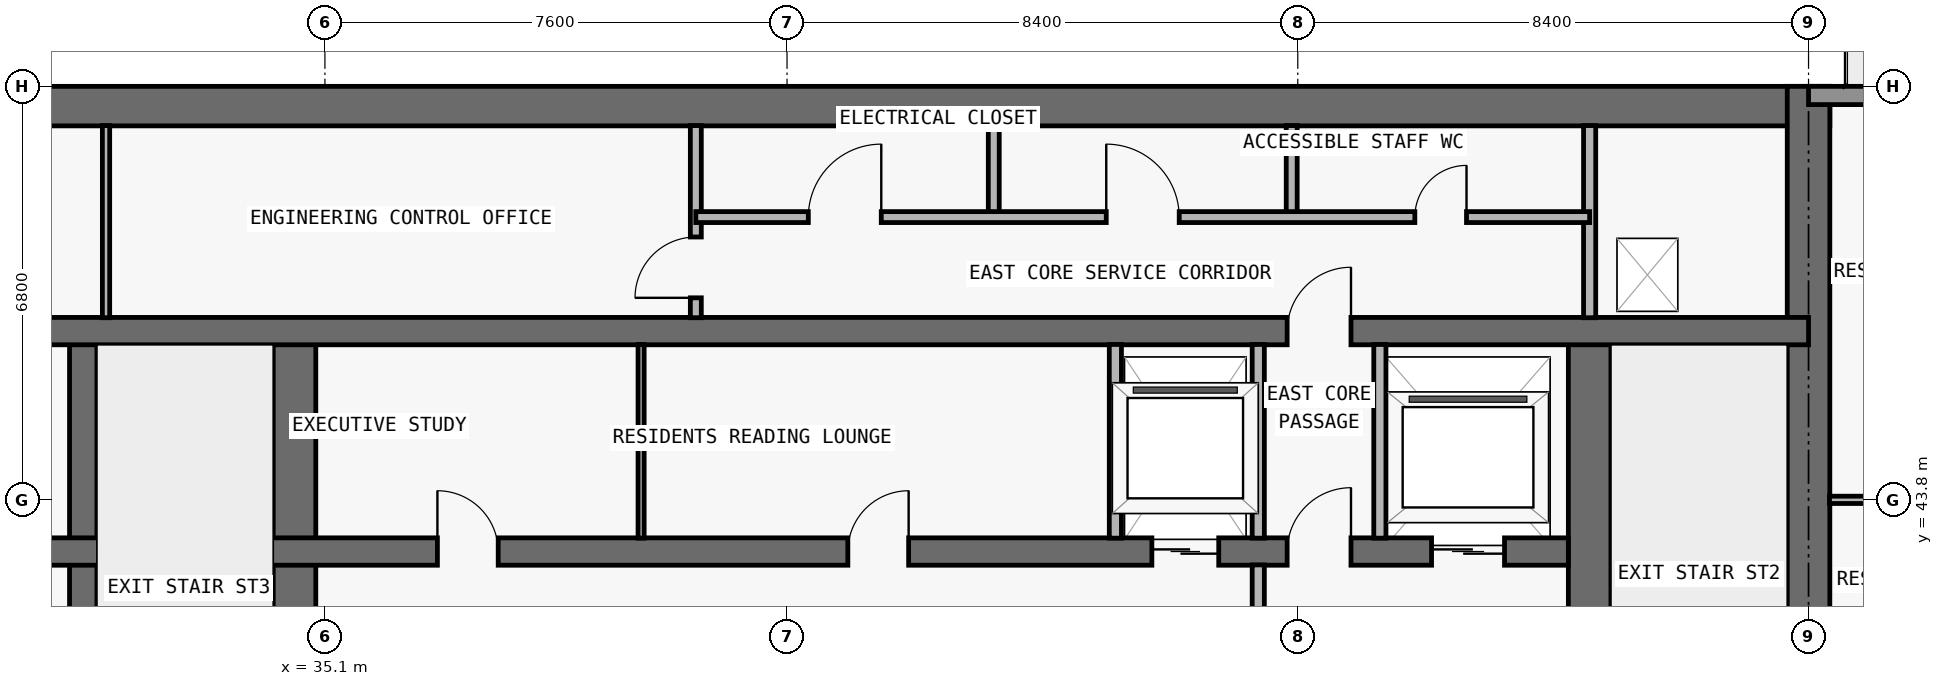
"""IFC4 building model, lengths in metres.
Left out: names, types, materials, properties, quantities, classifications, styles, units other than length and angle.
Written with IfcOpenShell. Run it as: python <this file> out.ifc"""

import sys

from ifc_helpers import new_model, si_unit, direction, frame, frame_2d, origin, place, context, subcontext, project, spatial, rectangle, extrude, element, fill, save


model = new_model("IFC4")
c1 = context("Model", 3, precision=1e-05, world=origin(), true_north=direction((0.0, 1.0)))
c2 = subcontext(c1, "Body", "Model", "MODEL_VIEW")
j1 = project(units=[si_unit("LENGTHUNIT", "METRE"), si_unit("PLANEANGLEUNIT", "RADIAN")], contexts=[c1])
p1 = place(None, origin())
s1 = spatial("IfcSite", under=j1, at=p1, CompositionType="ELEMENT")
p2 = place(p1, origin())
s2 = spatial("IfcBuilding", under=s1, at=p2, CompositionType="ELEMENT")
p3 = place(p2, frame((0.0, 0.0, 246.3)))
s3 = spatial("IfcBuildingStorey", under=s2, at=p3, CompositionType="ELEMENT", Elevation=246.3)
p4 = place(p3, frame((17.95, 50.275, 0.0), z_axis=(0.0, 0.0, 1.0), x_axis=(1.0, 0.0, 0.0)))
e1 = element("IfcWall", 1, at=p4, inside=s3, PredefinedType="SHEAR", context=c2, shape_type="SweptSolid", body=[
    extrude(rectangle(XDim=41.9, YDim=0.65, at=frame_2d((20.95, 0.0))), origin(), (0.0, 0.0, 1.0), 3.05),
])
p5 = place(p3, frame((59.5, 36.65, 0.0), z_axis=(0.0, 0.0, 1.0), x_axis=(0.0, 1.0, 0.0)))
e2 = element("IfcWall", 2, at=p5, inside=s3, PredefinedType="SHEAR", context=c2, shape_type="SweptSolid", body=[
    extrude(rectangle(XDim=13.95, YDim=0.7, at=frame_2d((6.975, 0.0))), origin(), (0.0, 0.0, 1.0), 3.05),
])
p6 = place(p3, frame((55.9, 37.0, 0.0), z_axis=(0.0, 0.0, 1.0), x_axis=(0.0, 1.0, 0.0)))
e3 = element("IfcWall", 3, at=p6, inside=s3, PredefinedType="SHEAR", context=c2, shape_type="SweptSolid", body=[
    extrude(rectangle(XDim=9.575, YDim=0.7, at=frame_2d((4.788, 0.0))), origin(), (0.0, 0.0, 1.0), 3.05),
])
p7 = place(p6, frame((0.55, 0.0, 0.0)))
e4 = element("IfcOpeningElement", 4, at=p7, cuts=e3, PredefinedType="OPENING", context=c2, shape_type="SweptSolid", body=[
    extrude(rectangle(XDim=1.1, YDim=2.15, at=frame_2d((0.55, 1.075))), frame((0.0, 0.36, 0.0), z_axis=(0.0, -1.0, 0.0), x_axis=(1.0, 0.0, 0.0)), (0.0, 0.0, 1.0), 0.72),
])
p8 = place(p3, frame((31.125, 37.0, 0.0), z_axis=(0.0, 0.0, 1.0), x_axis=(0.0, 1.0, 0.0)))
e5 = element("IfcWall", 5, at=p8, inside=s3, PredefinedType="SHEAR", context=c2, shape_type="SweptSolid", body=[
    extrude(rectangle(XDim=9.575, YDim=0.45, at=frame_2d((4.788, 0.0))), origin(), (0.0, 0.0, 1.0), 3.05),
])
p9 = place(p3, frame((34.6, 37.0, 0.0), z_axis=(0.0, 0.0, 1.0), x_axis=(0.0, 1.0, 0.0)))
e6 = element("IfcWall", 6, at=p9, inside=s3, PredefinedType="SHEAR", context=c2, shape_type="SweptSolid", body=[
    extrude(rectangle(XDim=9.575, YDim=0.7, at=frame_2d((4.788, 0.0))), origin(), (0.0, 0.0, 1.0), 3.05),
])
p10 = place(p3, frame((22.25, 42.95, 0.0), z_axis=(0.0, 0.0, 1.0), x_axis=(1.0, 0.0, 0.0)))
e7 = element("IfcWall", 7, at=p10, inside=s3, PredefinedType="SHEAR", context=c2, shape_type="SweptSolid", body=[
    extrude(rectangle(XDim=33.3, YDim=0.45, at=frame_2d((16.65, 0.0))), origin(), (0.0, 0.0, 1.0), 3.05),
])
p11 = place(p10, frame((1.05, 0.0, 0.0)))
e8 = element("IfcOpeningElement", 8, at=p11, cuts=e7, PredefinedType="OPENING", context=c2, shape_type="SweptSolid", body=[
    extrude(rectangle(XDim=1.2, YDim=2.2, at=frame_2d((0.6, 1.1))), frame((0.0, 0.235, 0.0), z_axis=(0.0, -1.0, 0.0), x_axis=(1.0, 0.0, 0.0)), (0.0, 0.0, 1.0), 0.47),
])
p12 = place(p10, frame((31.05, 0.0, 0.0)))
e9 = element("IfcOpeningElement", 9, at=p12, cuts=e7, PredefinedType="OPENING", context=c2, shape_type="SweptSolid", body=[
    extrude(rectangle(XDim=1.2, YDim=2.2, at=frame_2d((0.6, 1.1))), frame((0.0, 0.235, 0.0), z_axis=(0.0, -1.0, 0.0), x_axis=(1.0, 0.0, 0.0)), (0.0, 0.0, 1.0), 0.47),
])
p13 = place(p10, frame((26.45, 0.0, 0.0)))
e10 = element("IfcOpeningElement", 10, at=p13, cuts=e7, PredefinedType="OPENING", context=c2, shape_type="SweptSolid", body=[
    extrude(rectangle(XDim=1.1, YDim=2.2, at=frame_2d((0.55, 1.1))), frame((0.0, 0.235, 0.0), z_axis=(0.0, -1.0, 0.0), x_axis=(1.0, 0.0, 0.0)), (0.0, 0.0, 1.0), 0.47),
])
p14 = place(p10, frame((5.95, 0.0, 0.0)))
e11 = element("IfcOpeningElement", 11, at=p14, cuts=e7, PredefinedType="OPENING", context=c2, shape_type="SweptSolid", body=[
    extrude(rectangle(XDim=1.1, YDim=2.2, at=frame_2d((0.55, 1.1))), frame((0.0, 0.235, 0.0), z_axis=(0.0, -1.0, 0.0), x_axis=(1.0, 0.0, 0.0)), (0.0, 0.0, 1.0), 0.47),
])
p15 = place(p10, frame((3.625, 0.0, 0.0)))
e12 = element("IfcOpeningElement", 12, at=p15, cuts=e7, PredefinedType="OPENING", context=c2, shape_type="SweptSolid", body=[
    extrude(rectangle(XDim=1.05, YDim=2.15, at=frame_2d((0.525, 1.075))), frame((0.0, 0.235, 0.0), z_axis=(0.0, -1.0, 0.0), x_axis=(1.0, 0.0, 0.0)), (0.0, 0.0, 1.0), 0.47),
])
p16 = place(p10, frame((28.675, 0.0, 0.0)))
e13 = element("IfcOpeningElement", 13, at=p16, cuts=e7, PredefinedType="OPENING", context=c2, shape_type="SweptSolid", body=[
    extrude(rectangle(XDim=1.05, YDim=2.15, at=frame_2d((0.525, 1.075))), frame((0.0, 0.235, 0.0), z_axis=(0.0, -1.0, 0.0), x_axis=(1.0, 0.0, 0.0)), (0.0, 0.0, 1.0), 0.47),
])
p17 = place(p10, frame((14.7, 0.0, 0.0)))
e14 = element("IfcOpeningElement", 14, at=p17, cuts=e7, PredefinedType="OPENING", context=c2, shape_type="SweptSolid", body=[
    extrude(rectangle(XDim=1.0, YDim=2.2, at=frame_2d((0.5, 1.1))), frame((0.0, 0.235, 0.0), z_axis=(0.0, -1.0, 0.0), x_axis=(1.0, 0.0, 0.0)), (0.0, 0.0, 1.0), 0.47),
])
p18 = place(p10, frame((21.45, 0.0, 0.0)))
e15 = element("IfcOpeningElement", 15, at=p18, cuts=e7, PredefinedType="OPENING", context=c2, shape_type="SweptSolid", body=[
    extrude(rectangle(XDim=1.0, YDim=2.2, at=frame_2d((0.5, 1.1))), frame((0.0, 0.235, 0.0), z_axis=(0.0, -1.0, 0.0), x_axis=(1.0, 0.0, 0.0)), (0.0, 0.0, 1.0), 0.47),
])
p19 = place(p3, frame((18.3, 46.575, 0.0), z_axis=(0.0, 0.0, 1.0), x_axis=(1.0, 0.0, 0.0)))
e16 = element("IfcWall", 16, at=p19, inside=s3, PredefinedType="SHEAR", context=c2, shape_type="SweptSolid", body=[
    extrude(rectangle(XDim=41.2, YDim=0.45, at=frame_2d((20.6, 0.0))), origin(), (0.0, 0.0, 1.0), 3.05),
])
p20 = place(p19, frame((7.6, 0.0, 0.0)))
e17 = element("IfcOpeningElement", 17, at=p20, cuts=e16, PredefinedType="OPENING", context=c2, shape_type="SweptSolid", body=[
    extrude(rectangle(XDim=1.0, YDim=2.2, at=frame_2d((0.5, 1.1))), frame((0.0, 0.235, 0.0), z_axis=(0.0, -1.0, 0.0), x_axis=(1.0, 0.0, 0.0)), (0.0, 0.0, 1.0), 0.47),
])
p21 = place(p19, frame((32.625, 0.0, 0.0)))
e18 = element("IfcOpeningElement", 18, at=p21, cuts=e16, PredefinedType="OPENING", context=c2, shape_type="SweptSolid", body=[
    extrude(rectangle(XDim=1.05, YDim=2.15, at=frame_2d((0.525, 1.075))), frame((0.0, 0.235, 0.0), z_axis=(0.0, -1.0, 0.0), x_axis=(1.0, 0.0, 0.0)), (0.0, 0.0, 1.0), 0.47),
])
p22 = place(p3, frame((59.5, 50.45, 0.0), z_axis=(0.0, 0.0, 1.0), x_axis=(1.0, 0.0, 0.0)))
e19 = element("IfcWall", 19, at=p22, inside=s3, PredefinedType="STANDARD", context=c2, shape_type="SweptSolid", body=[
    extrude(rectangle(XDim=6.2, YDim=0.3, at=frame_2d((3.1, 0.0))), origin(), (0.0, 0.0, 1.0), 3.05),
])
p23 = place(p22, frame((2.1, 0.0, 0.0)))
e20 = element("IfcOpeningElement", 20, at=p23, cuts=e19, PredefinedType="OPENING", context=c2, shape_type="SweptSolid", body=[
    extrude(rectangle(XDim=2.0, YDim=2.3, at=frame_2d((1.0, 1.15))), frame((0.0, 0.16, 0.0), z_axis=(0.0, -1.0, 0.0), x_axis=(1.0, 0.0, 0.0)), (0.0, 0.0, 1.0), 0.32),
])
p24 = place(p3, frame((31.5, 46.795, 0.0), z_axis=(0.0, 0.0, 1.0), x_axis=(0.0, 1.0, 0.0)))
e21 = element("IfcWall", 21, at=p24, inside=s3, PredefinedType="PARTITIONING", context=c2, shape_type="SweptSolid", body=[
    extrude(rectangle(XDim=3.16, YDim=0.12, at=frame_2d((1.58, 0.0))), origin(), (0.0, 0.0, 1.0), 3.05),
])
p25 = place(p3, frame((40.3, 43.17, 0.0), z_axis=(0.0, 0.0, 1.0), x_axis=(0.0, 1.0, 0.0)))
e22 = element("IfcWall", 22, at=p25, inside=s3, PredefinedType="MOVABLE", context=c2, shape_type="SweptSolid", body=[
    extrude(rectangle(XDim=3.185, YDim=0.1, at=frame_2d((1.593, 0.0))), origin(), (0.0, 0.0, 1.0), 3.05),
])
p26 = place(p3, frame((41.2, 46.795, 0.0), z_axis=(0.0, 0.0, 1.0), x_axis=(0.0, 1.0, 0.0)))
e23 = element("IfcWall", 23, at=p26, inside=s3, PredefinedType="PARTITIONING", context=c2, shape_type="SweptSolid", body=[
    extrude(rectangle(XDim=3.16, YDim=0.18, at=frame_2d((1.58, 0.0))), origin(), (0.0, 0.0, 1.0), 3.05),
])
p27 = place(p26, frame((0.327, 0.0, 0.0)))
e24 = element("IfcOpeningElement", 24, at=p27, cuts=e23, PredefinedType="OPENING", context=c2, shape_type="SweptSolid", body=[
    extrude(rectangle(XDim=1.0, YDim=2.2, at=frame_2d((0.5, 1.1))), frame((0.0, 0.1, 0.0), z_axis=(0.0, -1.0, 0.0), x_axis=(1.0, 0.0, 0.0)), (0.0, 0.0, 1.0), 0.2),
])
p28 = place(p3, frame((46.1, 48.45, 0.0), z_axis=(0.0, 0.0, 1.0), x_axis=(0.0, 1.0, 0.0)))
e25 = element("IfcWall", 25, at=p28, inside=s3, PredefinedType="PARTITIONING", context=c2, shape_type="SweptSolid", body=[
    extrude(rectangle(XDim=1.505, YDim=0.18, at=frame_2d((0.752, 0.0))), origin(), (0.0, 0.0, 1.0), 3.05),
])
p29 = place(p3, frame((48.1, 43.17, 0.0), z_axis=(0.0, 0.0, 1.0), x_axis=(0.0, 1.0, 0.0)))
e26 = element("IfcWall", 26, at=p29, inside=s3, PredefinedType="PARTITIONING", context=c2, shape_type="SweptSolid", body=[
    extrude(rectangle(XDim=3.185, YDim=0.2, at=frame_2d((1.593, 0.0))), origin(), (0.0, 0.0, 1.0), 3.05),
])
p30 = place(p3, frame((50.45, 37.345, 0.0), z_axis=(0.0, 0.0, 1.0), x_axis=(0.0, 1.0, 0.0)))
e27 = element("IfcWall", 27, at=p30, inside=s3, PredefinedType="PARTITIONING", context=c2, shape_type="SweptSolid", body=[
    extrude(rectangle(XDim=5.385, YDim=0.2, at=frame_2d((2.692, 0.0))), origin(), (0.0, 0.0, 1.0), 3.05),
])
p31 = place(p3, frame((50.45, 43.17, 0.0), z_axis=(0.0, 0.0, 1.0), x_axis=(0.0, 1.0, 0.0)))
e28 = element("IfcWall", 28, at=p31, inside=s3, PredefinedType="PARTITIONING", context=c2, shape_type="SweptSolid", body=[
    extrude(rectangle(XDim=3.185, YDim=0.2, at=frame_2d((1.593, 0.0))), origin(), (0.0, 0.0, 1.0), 3.05),
])
p32 = place(p3, frame((51.0, 48.45, 0.0), z_axis=(0.0, 0.0, 1.0), x_axis=(0.0, 1.0, 0.0)))
e29 = element("IfcWall", 29, at=p32, inside=s3, PredefinedType="PARTITIONING", context=c2, shape_type="SweptSolid", body=[
    extrude(rectangle(XDim=1.505, YDim=0.18, at=frame_2d((0.752, 0.0))), origin(), (0.0, 0.0, 1.0), 3.05),
])
p33 = place(p3, frame((52.45, 43.17, 0.0), z_axis=(0.0, 0.0, 1.0), x_axis=(0.0, 1.0, 0.0)))
e30 = element("IfcWall", 30, at=p33, inside=s3, PredefinedType="PARTITIONING", context=c2, shape_type="SweptSolid", body=[
    extrude(rectangle(XDim=3.185, YDim=0.2, at=frame_2d((1.593, 0.0))), origin(), (0.0, 0.0, 1.0), 3.05),
])
p34 = place(p3, frame((55.9, 46.795, 0.0), z_axis=(0.0, 0.0, 1.0), x_axis=(0.0, 1.0, 0.0)))
e31 = element("IfcWall", 31, at=p34, inside=s3, PredefinedType="PARTITIONING", context=c2, shape_type="SweptSolid", body=[
    extrude(rectangle(XDim=3.16, YDim=0.2, at=frame_2d((1.58, 0.0))), origin(), (0.0, 0.0, 1.0), 3.05),
])
p35 = place(p3, frame((59.845, 43.8, 0.0), z_axis=(0.0, 0.0, 1.0), x_axis=(1.0, 0.0, 0.0)))
e32 = element("IfcWall", 32, at=p35, inside=s3, PredefinedType="PARTITIONING", context=c2, shape_type="SweptSolid", body=[
    extrude(rectangle(XDim=9.56, YDim=0.12, at=frame_2d((4.78, 0.0))), origin(), (0.0, 0.0, 1.0), 2.418),
])
p36 = place(p35, frame((3.63, 0.0, 0.0)))
e33 = element("IfcOpeningElement", 33, at=p36, cuts=e32, PredefinedType="OPENING", context=c2, shape_type="SweptSolid", body=[
    extrude(rectangle(XDim=0.9, YDim=2.15, at=frame_2d((0.45, 1.075))), frame((0.0, 0.07, 0.0), z_axis=(0.0, -1.0, 0.0), x_axis=(1.0, 0.0, 0.0)), (0.0, 0.0, 1.0), 0.14),
])
p37 = place(p35, frame((0.728, 0.0, 0.0)))
e34 = element("IfcOpeningElement", 34, at=p37, cuts=e32, PredefinedType="OPENING", context=c2, shape_type="SweptSolid", body=[
    extrude(rectangle(XDim=0.85, YDim=2.1, at=frame_2d((0.425, 1.05))), frame((0.0, 0.07, 0.0), z_axis=(0.0, -1.0, 0.0), x_axis=(1.0, 0.0, 0.0)), (0.0, 0.0, 1.0), 0.14),
])
p38 = place(p3, frame((41.2, 48.45, 0.0), z_axis=(0.0, 0.0, 1.0), x_axis=(1.0, 0.0, 0.0)))
e35 = element("IfcWall", 35, at=p38, inside=s3, PredefinedType="PARTITIONING", context=c2, shape_type="SweptSolid", body=[
    extrude(rectangle(XDim=14.7, YDim=0.18, at=frame_2d((7.35, 0.0))), origin(), (0.0, 0.0, 1.0), 3.05),
])
p39 = place(p38, frame((1.85, 0.0, 0.0)))
e36 = element("IfcOpeningElement", 36, at=p39, cuts=e35, PredefinedType="OPENING", context=c2, shape_type="SweptSolid", body=[
    extrude(rectangle(XDim=1.2, YDim=2.2, at=frame_2d((0.6, 1.1))), frame((0.0, 0.1, 0.0), z_axis=(0.0, -1.0, 0.0), x_axis=(1.0, 0.0, 0.0)), (0.0, 0.0, 1.0), 0.2),
])
p40 = place(p38, frame((6.75, 0.0, 0.0)))
e37 = element("IfcOpeningElement", 37, at=p40, cuts=e35, PredefinedType="OPENING", context=c2, shape_type="SweptSolid", body=[
    extrude(rectangle(XDim=1.2, YDim=2.2, at=frame_2d((0.6, 1.1))), frame((0.0, 0.1, 0.0), z_axis=(0.0, -1.0, 0.0), x_axis=(1.0, 0.0, 0.0)), (0.0, 0.0, 1.0), 0.2),
])
p41 = place(p38, frame((11.825, 0.0, 0.0)))
e38 = element("IfcOpeningElement", 38, at=p41, cuts=e35, PredefinedType="OPENING", context=c2, shape_type="SweptSolid", body=[
    extrude(rectangle(XDim=0.85, YDim=2.1, at=frame_2d((0.425, 1.05))), frame((0.0, 0.1, 0.0), z_axis=(0.0, -1.0, 0.0), x_axis=(1.0, 0.0, 0.0)), (0.0, 0.0, 1.0), 0.2),
])
p42 = place(p12, origin())
e39 = element("IfcDoor", 39, at=p42, inside=s3, OperationType="DOUBLE_DOOR_SLIDING", PredefinedType="DOOR", context=c2, shape_type="SweptSolid", body=[
    extrude(rectangle(XDim=1.2, YDim=2.2, at=frame_2d((0.6, 1.1))), frame((0.0, 0.025, 0.0), z_axis=(0.0, -1.0, 0.0), x_axis=(1.0, 0.0, 0.0)), (0.0, 0.0, 1.0), 0.05),
])
fill(e9, e39)
p43 = place(p13, origin())
e40 = element("IfcDoor", 40, at=p43, inside=s3, OperationType="DOUBLE_DOOR_SLIDING", PredefinedType="DOOR", context=c2, shape_type="SweptSolid", body=[
    extrude(rectangle(XDim=1.1, YDim=2.2, at=frame_2d((0.55, 1.1))), frame((0.0, 0.025, 0.0), z_axis=(0.0, -1.0, 0.0), x_axis=(1.0, 0.0, 0.0)), (0.0, 0.0, 1.0), 0.05),
])
fill(e10, e40)
p44 = place(p16, origin())
e41 = element("IfcDoor", 41, at=p44, inside=s3, OperationType="SINGLE_SWING_RIGHT", PredefinedType="DOOR", context=c2, shape_type="SweptSolid", body=[
    extrude(rectangle(XDim=1.05, YDim=2.15, at=frame_2d((0.525, 1.075))), frame((0.0, 0.025, 0.0), z_axis=(0.0, -1.0, 0.0), x_axis=(1.0, 0.0, 0.0)), (0.0, 0.0, 1.0), 0.05),
])
fill(e13, e41)
p45 = place(p17, origin())
e42 = element("IfcDoor", 42, at=p45, inside=s3, OperationType="SINGLE_SWING_LEFT", PredefinedType="DOOR", context=c2, shape_type="SweptSolid", body=[
    extrude(rectangle(XDim=1.0, YDim=2.2, at=frame_2d((0.5, 1.1))), frame((0.0, 0.025, 0.0), z_axis=(0.0, -1.0, 0.0), x_axis=(1.0, 0.0, 0.0)), (0.0, 0.0, 1.0), 0.05),
])
fill(e14, e42)
p46 = place(p18, origin())
e43 = element("IfcDoor", 43, at=p46, inside=s3, OperationType="SINGLE_SWING_RIGHT", PredefinedType="DOOR", context=c2, shape_type="SweptSolid", body=[
    extrude(rectangle(XDim=1.0, YDim=2.2, at=frame_2d((0.5, 1.1))), frame((0.0, 0.025, 0.0), z_axis=(0.0, -1.0, 0.0), x_axis=(1.0, 0.0, 0.0)), (0.0, 0.0, 1.0), 0.05),
])
fill(e15, e43)
p47 = place(p21, origin())
e44 = element("IfcDoor", 44, at=p47, inside=s3, OperationType="SINGLE_SWING_RIGHT", PredefinedType="DOOR", context=c2, shape_type="SweptSolid", body=[
    extrude(rectangle(XDim=1.05, YDim=2.15, at=frame_2d((0.525, 1.075))), frame((0.0, 0.025, 0.0), z_axis=(0.0, -1.0, 0.0), x_axis=(1.0, 0.0, 0.0)), (0.0, 0.0, 1.0), 0.05),
])
fill(e18, e44)
p48 = place(p27, origin())
e45 = element("IfcDoor", 45, at=p48, inside=s3, OperationType="SINGLE_SWING_LEFT", PredefinedType="DOOR", context=c2, shape_type="SweptSolid", body=[
    extrude(rectangle(XDim=1.0, YDim=2.2, at=frame_2d((0.5, 1.1))), frame((0.0, 0.025, 0.0), z_axis=(0.0, -1.0, 0.0), x_axis=(1.0, 0.0, 0.0)), (0.0, 0.0, 1.0), 0.05),
])
fill(e24, e45)
p49 = place(p39, origin())
e46 = element("IfcDoor", 46, at=p49, inside=s3, OperationType="SINGLE_SWING_RIGHT", PredefinedType="DOOR", context=c2, shape_type="SweptSolid", body=[
    extrude(rectangle(XDim=1.2, YDim=2.2, at=frame_2d((0.6, 1.1))), frame((0.0, 0.025, 0.0), z_axis=(0.0, -1.0, 0.0), x_axis=(1.0, 0.0, 0.0)), (0.0, 0.0, 1.0), 0.05),
])
fill(e36, e46)
p50 = place(p40, origin())
e47 = element("IfcDoor", 47, at=p50, inside=s3, OperationType="SINGLE_SWING_LEFT", PredefinedType="DOOR", context=c2, shape_type="SweptSolid", body=[
    extrude(rectangle(XDim=1.2, YDim=2.2, at=frame_2d((0.6, 1.1))), frame((0.0, 0.025, 0.0), z_axis=(0.0, -1.0, 0.0), x_axis=(1.0, 0.0, 0.0)), (0.0, 0.0, 1.0), 0.05),
])
fill(e37, e47)
p51 = place(p41, origin())
e48 = element("IfcDoor", 48, at=p51, inside=s3, OperationType="SINGLE_SWING_RIGHT", PredefinedType="DOOR", context=c2, shape_type="SweptSolid", body=[
    extrude(rectangle(XDim=0.85, YDim=2.1, at=frame_2d((0.425, 1.05))), frame((0.0, 0.025, 0.0), z_axis=(0.0, -1.0, 0.0), x_axis=(1.0, 0.0, 0.0)), (0.0, 0.0, 1.0), 0.05),
])
fill(e38, e48)
save(model, sys.argv[1])
